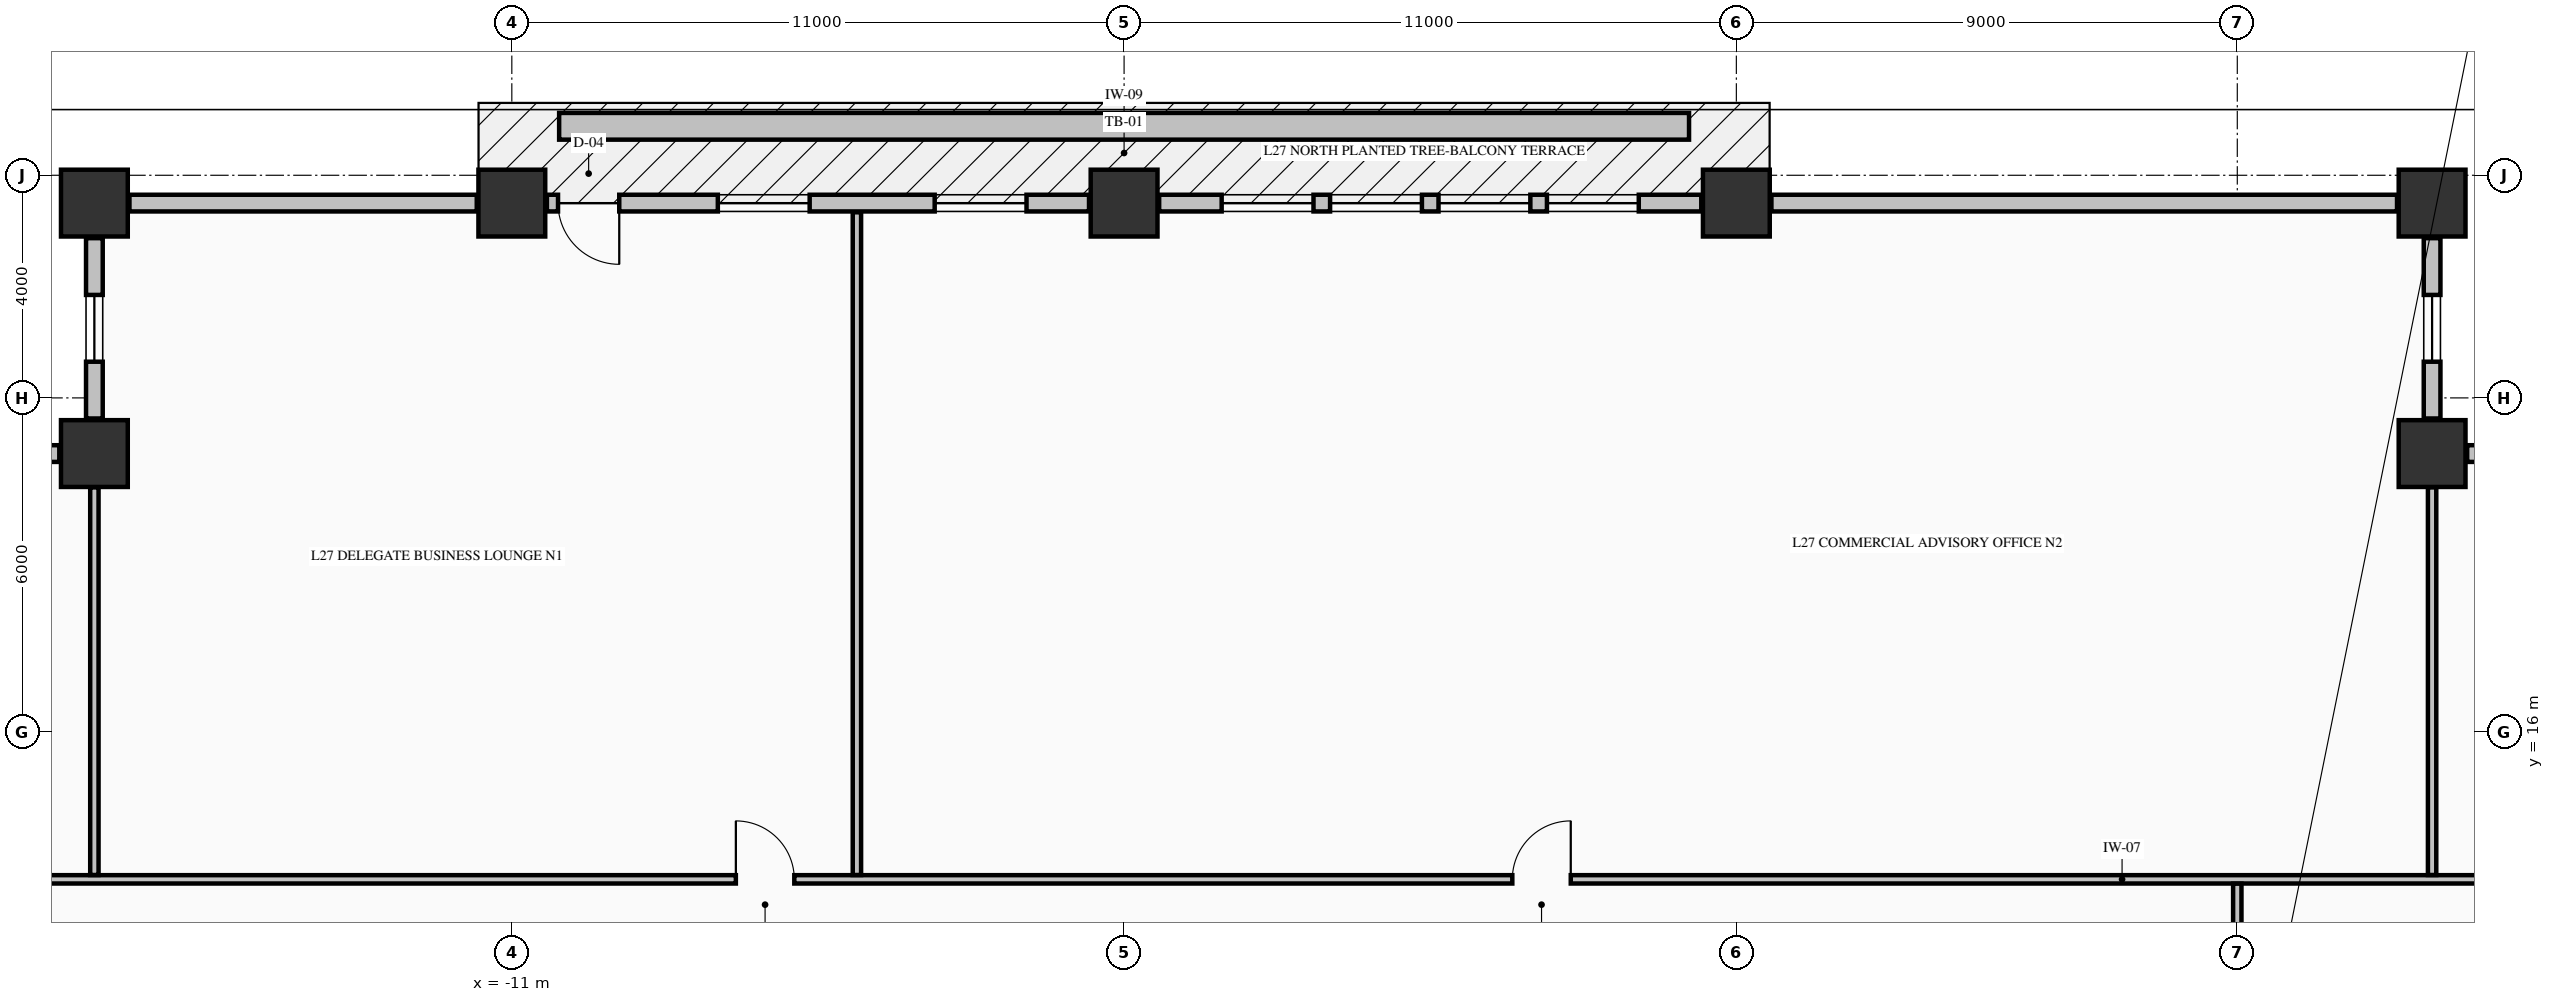
"""IFC4 building model, lengths in metres.
Left out: names, types, materials, properties, quantities, classifications, styles, units other than length and angle.
Written with IfcOpenShell. Run it as: python <this file> out.ifc"""

import sys

from ifc_helpers import new_model, si_unit, direction, frame, frame_2d, origin, origin_2d, place, context, subcontext, project, spatial, rectangle, extrude, element, fill, save


model = new_model("IFC4")
c1 = context("Model", 3, precision=1e-05, world=origin(), true_north=direction((0.0, 1.0)))
c2 = subcontext(c1, "Body", "Model", "MODEL_VIEW")
j1 = project(units=[si_unit("LENGTHUNIT", "METRE"), si_unit("PLANEANGLEUNIT", "RADIAN")], contexts=[c1])
p1 = place(None, origin())
s1 = spatial("IfcSite", under=j1, at=p1, CompositionType="ELEMENT")
p2 = place(p1, origin())
s2 = spatial("IfcBuilding", under=s1, at=p2, CompositionType="ELEMENT")
p3 = place(p2, frame((0.0, 0.0, 109.21)))
s3 = spatial("IfcBuildingStorey", under=s2, at=p3, CompositionType="ELEMENT", Elevation=109.21)
for number, where, z_axis, x_axis in (
    (1, (-18.5, 25.5, -0.25), (0.0, 0.0, 1.0), (1.0, 0.0, 0.0)),
    (2, (-11.0, 25.5, -0.25), (0.0, 0.0, 1.0), (1.0, 0.0, 0.0)),
    (3, (0.0, 25.5, -0.25), (0.0, 0.0, 1.0), (1.0, 0.0, 0.0)),
    (4, (11.0, 25.5, -0.25), (0.0, 0.0, 1.0), (1.0, 0.0, 0.0)),
    (5, (23.5, 25.5, -0.25), (0.0, 0.0, 1.0), (1.0, 0.0, 0.0)),
    (6, (23.5, 21.0, -0.25), (0.0, 0.0, 1.0), (1.0, 0.0, 0.0)),
    (7, (-18.5, 21.0, -0.25), (0.0, 0.0, 1.0), (1.0, 0.0, 0.0)),
):
    element("IfcColumn", number, at=place(p3, frame(where, z_axis=z_axis, x_axis=x_axis)), inside=s3, PredefinedType="COLUMN", context=c2, shape_type="SweptSolid", body=[
        extrude(rectangle(XDim=1.2, YDim=1.2, at=origin_2d()), origin(), (0.0, 0.0, 1.0), 3.57),
    ])
p4 = place(p3, frame((27.37, 21.0, 0.0), z_axis=(0.0, 0.0, 1.0), x_axis=(-1.0, 0.0, 0.0)))
e8 = element("IfcWall", 8, at=p4, inside=s3, PredefinedType="STANDARD", context=c2, shape_type="SweptSolid", body=[
    extrude(rectangle(XDim=3.24, YDim=0.3, at=frame_2d((1.62, 0.0))), origin(), (0.0, 0.0, 1.0), 2.712),
])
p5 = place(p4, frame((1.02, 0.0, 0.82)))
e9 = element("IfcOpeningElement", 9, at=p5, cuts=e8, PredefinedType="OPENING", context=c2, shape_type="SweptSolid", body=[
    extrude(rectangle(XDim=1.2, YDim=1.65, at=frame_2d((0.6, 0.825))), frame((0.0, 0.16, 0.0), z_axis=(0.0, -1.0, 0.0), x_axis=(1.0, 0.0, 0.0)), (0.0, 0.0, 1.0), 0.32),
])
p6 = place(p3, frame((23.5, 21.63, 0.0), z_axis=(0.0, 0.0, 1.0), x_axis=(0.0, 1.0, 0.0)))
e10 = element("IfcWall", 10, at=p6, inside=s3, PredefinedType="STANDARD", context=c2, shape_type="SweptSolid", body=[
    extrude(rectangle(XDim=3.24, YDim=0.3, at=frame_2d((1.62, 0.0))), origin(), (0.0, 0.0, 1.0), 2.712),
])
p7 = place(p6, frame((1.02, 0.0, 0.82)))
e11 = element("IfcOpeningElement", 11, at=p7, cuts=e10, PredefinedType="OPENING", context=c2, shape_type="SweptSolid", body=[
    extrude(rectangle(XDim=1.2, YDim=1.65, at=frame_2d((0.6, 0.825))), frame((0.0, 0.16, 0.0), z_axis=(0.0, -1.0, 0.0), x_axis=(1.0, 0.0, 0.0)), (0.0, 0.0, 1.0), 0.32),
])
p8 = place(p3, frame((-18.5, 24.87, 0.0), z_axis=(0.0, 0.0, 1.0), x_axis=(0.0, -1.0, 0.0)))
e12 = element("IfcWall", 12, at=p8, inside=s3, PredefinedType="STANDARD", context=c2, shape_type="SweptSolid", body=[
    extrude(rectangle(XDim=3.24, YDim=0.3, at=frame_2d((1.62, 0.0))), origin(), (0.0, 0.0, 1.0), 2.712),
])
p9 = place(p8, frame((1.02, 0.0, 0.82)))
e13 = element("IfcOpeningElement", 13, at=p9, cuts=e12, PredefinedType="OPENING", context=c2, shape_type="SweptSolid", body=[
    extrude(rectangle(XDim=1.2, YDim=1.65, at=frame_2d((0.6, 0.825))), frame((0.0, 0.16, 0.0), z_axis=(0.0, -1.0, 0.0), x_axis=(1.0, 0.0, 0.0)), (0.0, 0.0, 1.0), 0.32),
])
p10 = place(p3, frame((-19.13, 21.0, 0.0), z_axis=(0.0, 0.0, 1.0), x_axis=(-1.0, 0.0, 0.0)))
e14 = element("IfcWall", 14, at=p10, inside=s3, PredefinedType="STANDARD", context=c2, shape_type="SweptSolid", body=[
    extrude(rectangle(XDim=3.24, YDim=0.3, at=frame_2d((1.62, 0.0))), origin(), (0.0, 0.0, 1.0), 2.712),
])
p11 = place(p10, frame((1.02, 0.0, 0.82)))
e15 = element("IfcOpeningElement", 15, at=p11, cuts=e14, PredefinedType="OPENING", context=c2, shape_type="SweptSolid", body=[
    extrude(rectangle(XDim=1.2, YDim=1.65, at=frame_2d((0.6, 0.825))), frame((0.0, 0.16, 0.0), z_axis=(0.0, -1.0, 0.0), x_axis=(1.0, 0.0, 0.0)), (0.0, 0.0, 1.0), 0.32),
])
p12 = place(p3, frame((-11.63, 25.5, 0.0), z_axis=(0.0, 0.0, 1.0), x_axis=(-1.0, 0.0, 0.0)))
e16 = element("IfcWall", 16, at=p12, inside=s3, PredefinedType="STANDARD", context=c2, shape_type="SweptSolid", body=[
    extrude(rectangle(XDim=6.24, YDim=0.3, at=frame_2d((3.12, 0.0))), origin(), (0.0, 0.0, 1.0), 2.712),
])
p13 = place(p3, frame((-0.63, 25.5, 0.0), z_axis=(0.0, 0.0, 1.0), x_axis=(-1.0, 0.0, 0.0)))
e17 = element("IfcWall", 17, at=p13, inside=s3, PredefinedType="STANDARD", context=c2, shape_type="SweptSolid", body=[
    extrude(rectangle(XDim=9.74, YDim=0.3, at=frame_2d((4.87, 0.0))), origin(), (0.0, 0.0, 1.0), 2.712),
])
p14 = place(p13, frame((8.44, 0.0, 0.0)))
e18 = element("IfcOpeningElement", 18, at=p14, cuts=e17, PredefinedType="OPENING", context=c2, shape_type="SweptSolid", body=[
    extrude(rectangle(XDim=1.1, YDim=2.15, at=frame_2d((0.55, 1.075))), frame((0.0, 0.16, 0.0), z_axis=(0.0, -1.0, 0.0), x_axis=(1.0, 0.0, 0.0)), (0.0, 0.0, 1.0), 0.32),
])
p15 = place(p13, frame((1.123, 0.0, 0.8)))
e19 = element("IfcOpeningElement", 19, at=p15, cuts=e17, PredefinedType="OPENING", context=c2, shape_type="SweptSolid", body=[
    extrude(rectangle(XDim=1.65, YDim=1.7, at=frame_2d((0.825, 0.85))), frame((0.0, 0.16, 0.0), z_axis=(0.0, -1.0, 0.0), x_axis=(1.0, 0.0, 0.0)), (0.0, 0.0, 1.0), 0.32),
])
p16 = place(p13, frame((5.019, 0.0, 0.8)))
e20 = element("IfcOpeningElement", 20, at=p16, cuts=e17, PredefinedType="OPENING", context=c2, shape_type="SweptSolid", body=[
    extrude(rectangle(XDim=1.65, YDim=1.7, at=frame_2d((0.825, 0.85))), frame((0.0, 0.16, 0.0), z_axis=(0.0, -1.0, 0.0), x_axis=(1.0, 0.0, 0.0)), (0.0, 0.0, 1.0), 0.32),
])
p17 = place(p3, frame((10.37, 25.5, 0.0), z_axis=(0.0, 0.0, 1.0), x_axis=(-1.0, 0.0, 0.0)))
e21 = element("IfcWall", 21, at=p17, inside=s3, PredefinedType="STANDARD", context=c2, shape_type="SweptSolid", body=[
    extrude(rectangle(XDim=9.74, YDim=0.3, at=frame_2d((4.87, 0.0))), origin(), (0.0, 0.0, 1.0), 2.712),
])
p18 = place(p17, frame((1.123, 0.0, 0.8)))
e22 = element("IfcOpeningElement", 22, at=p18, cuts=e21, PredefinedType="OPENING", context=c2, shape_type="SweptSolid", body=[
    extrude(rectangle(XDim=1.65, YDim=1.7, at=frame_2d((0.825, 0.85))), frame((0.0, 0.16, 0.0), z_axis=(0.0, -1.0, 0.0), x_axis=(1.0, 0.0, 0.0)), (0.0, 0.0, 1.0), 0.32),
])
p19 = place(p17, frame((3.071, 0.0, 0.8)))
e23 = element("IfcOpeningElement", 23, at=p19, cuts=e21, PredefinedType="OPENING", context=c2, shape_type="SweptSolid", body=[
    extrude(rectangle(XDim=1.65, YDim=1.7, at=frame_2d((0.825, 0.85))), frame((0.0, 0.16, 0.0), z_axis=(0.0, -1.0, 0.0), x_axis=(1.0, 0.0, 0.0)), (0.0, 0.0, 1.0), 0.32),
])
p20 = place(p17, frame((5.019, 0.0, 0.8)))
e24 = element("IfcOpeningElement", 24, at=p20, cuts=e21, PredefinedType="OPENING", context=c2, shape_type="SweptSolid", body=[
    extrude(rectangle(XDim=1.65, YDim=1.7, at=frame_2d((0.825, 0.85))), frame((0.0, 0.16, 0.0), z_axis=(0.0, -1.0, 0.0), x_axis=(1.0, 0.0, 0.0)), (0.0, 0.0, 1.0), 0.32),
])
p21 = place(p17, frame((6.967, 0.0, 0.8)))
e25 = element("IfcOpeningElement", 25, at=p21, cuts=e21, PredefinedType="OPENING", context=c2, shape_type="SweptSolid", body=[
    extrude(rectangle(XDim=1.65, YDim=1.7, at=frame_2d((0.825, 0.85))), frame((0.0, 0.16, 0.0), z_axis=(0.0, -1.0, 0.0), x_axis=(1.0, 0.0, 0.0)), (0.0, 0.0, 1.0), 0.32),
])
p22 = place(p3, frame((22.87, 25.5, 0.0), z_axis=(0.0, 0.0, 1.0), x_axis=(-1.0, 0.0, 0.0)))
e26 = element("IfcWall", 26, at=p22, inside=s3, PredefinedType="STANDARD", context=c2, shape_type="SweptSolid", body=[
    extrude(rectangle(XDim=11.24, YDim=0.3, at=frame_2d((5.62, 0.0))), origin(), (0.0, 0.0, 1.0), 2.712),
])
p23 = place(p3, frame((-22.835, 13.35, 0.0), z_axis=(0.0, 0.0, 1.0), x_axis=(1.0, 0.0, 0.0)))
e27 = element("IfcWall", 27, at=p23, inside=s3, PredefinedType="PARTITIONING", context=c2, shape_type="SweptSolid", body=[
    extrude(rectangle(XDim=50.67, YDim=0.15, at=frame_2d((25.335, 0.0))), origin(), (0.0, 0.0, 1.0), 3.32),
])
p24 = place(p23, frame((15.86, 0.0, 0.0)))
e28 = element("IfcOpeningElement", 28, at=p24, cuts=e27, PredefinedType="OPENING", context=c2, shape_type="SweptSolid", body=[
    extrude(rectangle(XDim=1.05, YDim=2.15, at=frame_2d((0.525, 1.075))), frame((0.0, 0.085, 0.0), z_axis=(0.0, -1.0, 0.0), x_axis=(1.0, 0.0, 0.0)), (0.0, 0.0, 1.0), 0.17),
])
p25 = place(p23, frame((29.81, 0.0, 0.0)))
e29 = element("IfcOpeningElement", 29, at=p25, cuts=e27, PredefinedType="OPENING", context=c2, shape_type="SweptSolid", body=[
    extrude(rectangle(XDim=1.05, YDim=2.15, at=frame_2d((0.525, 1.075))), frame((0.0, 0.085, 0.0), z_axis=(0.0, -1.0, 0.0), x_axis=(1.0, 0.0, 0.0)), (0.0, 0.0, 1.0), 0.17),
])
p26 = place(p3, frame((-18.5, 13.428, 0.0), z_axis=(0.0, 0.0, 1.0), x_axis=(0.0, 1.0, 0.0)))
e30 = element("IfcWall", 30, at=p26, inside=s3, PredefinedType="PARTITIONING", context=c2, shape_type="SweptSolid", body=[
    extrude(rectangle(XDim=6.966, YDim=0.15, at=frame_2d((3.483, 0.0))), origin(), (0.0, 0.0, 1.0), 3.32),
])
p27 = place(p3, frame((-4.8, 13.428, 0.0), z_axis=(0.0, 0.0, 1.0), x_axis=(0.0, 1.0, 0.0)))
e31 = element("IfcWall", 31, at=p27, inside=s3, PredefinedType="PARTITIONING", context=c2, shape_type="SweptSolid", body=[
    extrude(rectangle(XDim=11.907, YDim=0.15, at=frame_2d((5.954, 0.0))), origin(), (0.0, 0.0, 1.0), 3.32),
])
p28 = place(p3, frame((20.0, 11.006, 0.0), z_axis=(0.0, 0.0, 1.0), x_axis=(0.0, 1.0, 0.0)))
e32 = element("IfcWall", 32, at=p28, inside=s3, PredefinedType="PARTITIONING", context=c2, shape_type="SweptSolid", body=[
    extrude(rectangle(XDim=2.266, YDim=0.15, at=frame_2d((1.133, 0.0))), origin(), (0.0, 0.0, 1.0), 2.81),
])
p29 = place(p28, frame((0.449, 0.0, 0.0)))
e33 = element("IfcOpeningElement", 33, at=p29, cuts=e32, PredefinedType="OPENING", context=c2, shape_type="SweptSolid", body=[
    extrude(rectangle(XDim=0.95, YDim=2.15, at=frame_2d((0.475, 1.075))), frame((0.0, 0.085, 0.0), z_axis=(0.0, -1.0, 0.0), x_axis=(1.0, 0.0, 0.0)), (0.0, 0.0, 1.0), 0.17),
])
p30 = place(p3, frame((23.5, 13.428, 0.0), z_axis=(0.0, 0.0, 1.0), x_axis=(0.0, 1.0, 0.0)))
e34 = element("IfcWall", 34, at=p30, inside=s3, PredefinedType="PARTITIONING", context=c2, shape_type="SweptSolid", body=[
    extrude(rectangle(XDim=6.966, YDim=0.15, at=frame_2d((3.483, 0.0))), origin(), (0.0, 0.0, 1.0), 3.32),
])
p31 = place(p3, frame((-10.15, 26.88, -0.04), z_axis=(0.0, 0.0, 1.0), x_axis=(1.0, 0.0, 0.0)))
e35 = element("IfcWall", 35, at=p31, inside=s3, PredefinedType="PARAPET", context=c2, shape_type="SweptSolid", body=[
    extrude(rectangle(XDim=20.3, YDim=0.48, at=frame_2d((10.15, 0.0))), origin(), (0.0, 0.0, 1.0), 0.52),
])
p32 = place(p7, origin())
e36 = element("IfcWindow", 36, at=p32, inside=s3, PartitioningType="SINGLE_PANEL", PredefinedType="WINDOW", context=c2, shape_type="SweptSolid", body=[
    extrude(rectangle(XDim=1.2, YDim=1.65, at=frame_2d((0.6, 0.825))), frame((0.0, 0.03, 0.0), z_axis=(0.0, -1.0, 0.0), x_axis=(1.0, 0.0, 0.0)), (0.0, 0.0, 1.0), 0.06),
])
fill(e11, e36)
p33 = place(p9, origin())
e37 = element("IfcWindow", 37, at=p33, inside=s3, PartitioningType="SINGLE_PANEL", PredefinedType="WINDOW", context=c2, shape_type="SweptSolid", body=[
    extrude(rectangle(XDim=1.2, YDim=1.65, at=frame_2d((0.6, 0.825))), frame((0.0, 0.03, 0.0), z_axis=(0.0, -1.0, 0.0), x_axis=(1.0, 0.0, 0.0)), (0.0, 0.0, 1.0), 0.06),
])
fill(e13, e37)
p34 = place(p14, origin())
e38 = element("IfcDoor", 38, at=p34, inside=s3, OperationType="SINGLE_SWING_LEFT", PredefinedType="DOOR", context=c2, shape_type="SweptSolid", body=[
    extrude(rectangle(XDim=1.1, YDim=2.15, at=frame_2d((0.55, 1.075))), frame((0.0, 0.025, 0.0), z_axis=(0.0, -1.0, 0.0), x_axis=(1.0, 0.0, 0.0)), (0.0, 0.0, 1.0), 0.05),
])
fill(e18, e38)
p35 = place(p15, origin())
e39 = element("IfcWindow", 39, at=p35, inside=s3, PartitioningType="SINGLE_PANEL", PredefinedType="WINDOW", context=c2, shape_type="SweptSolid", body=[
    extrude(rectangle(XDim=1.65, YDim=1.7, at=frame_2d((0.825, 0.85))), frame((0.0, 0.03, 0.0), z_axis=(0.0, -1.0, 0.0), x_axis=(1.0, 0.0, 0.0)), (0.0, 0.0, 1.0), 0.06),
])
fill(e19, e39)
p36 = place(p16, origin())
e40 = element("IfcWindow", 40, at=p36, inside=s3, PartitioningType="SINGLE_PANEL", PredefinedType="WINDOW", context=c2, shape_type="SweptSolid", body=[
    extrude(rectangle(XDim=1.65, YDim=1.7, at=frame_2d((0.825, 0.85))), frame((0.0, 0.03, 0.0), z_axis=(0.0, -1.0, 0.0), x_axis=(1.0, 0.0, 0.0)), (0.0, 0.0, 1.0), 0.06),
])
fill(e20, e40)
p37 = place(p18, origin())
e41 = element("IfcWindow", 41, at=p37, inside=s3, PartitioningType="SINGLE_PANEL", PredefinedType="WINDOW", context=c2, shape_type="SweptSolid", body=[
    extrude(rectangle(XDim=1.65, YDim=1.7, at=frame_2d((0.825, 0.85))), frame((0.0, 0.03, 0.0), z_axis=(0.0, -1.0, 0.0), x_axis=(1.0, 0.0, 0.0)), (0.0, 0.0, 1.0), 0.06),
])
fill(e22, e41)
p38 = place(p19, origin())
e42 = element("IfcWindow", 42, at=p38, inside=s3, PartitioningType="SINGLE_PANEL", PredefinedType="WINDOW", context=c2, shape_type="SweptSolid", body=[
    extrude(rectangle(XDim=1.65, YDim=1.7, at=frame_2d((0.825, 0.85))), frame((0.0, 0.03, 0.0), z_axis=(0.0, -1.0, 0.0), x_axis=(1.0, 0.0, 0.0)), (0.0, 0.0, 1.0), 0.06),
])
fill(e23, e42)
p39 = place(p20, origin())
e43 = element("IfcWindow", 43, at=p39, inside=s3, PartitioningType="SINGLE_PANEL", PredefinedType="WINDOW", context=c2, shape_type="SweptSolid", body=[
    extrude(rectangle(XDim=1.65, YDim=1.7, at=frame_2d((0.825, 0.85))), frame((0.0, 0.03, 0.0), z_axis=(0.0, -1.0, 0.0), x_axis=(1.0, 0.0, 0.0)), (0.0, 0.0, 1.0), 0.06),
])
fill(e24, e43)
p40 = place(p21, origin())
e44 = element("IfcWindow", 44, at=p40, inside=s3, PartitioningType="SINGLE_PANEL", PredefinedType="WINDOW", context=c2, shape_type="SweptSolid", body=[
    extrude(rectangle(XDim=1.65, YDim=1.7, at=frame_2d((0.825, 0.85))), frame((0.0, 0.03, 0.0), z_axis=(0.0, -1.0, 0.0), x_axis=(1.0, 0.0, 0.0)), (0.0, 0.0, 1.0), 0.06),
])
fill(e25, e44)
p41 = place(p24, origin())
e45 = element("IfcDoor", 45, at=p41, inside=s3, OperationType="SINGLE_SWING_LEFT", PredefinedType="DOOR", context=c2, shape_type="SweptSolid", body=[
    extrude(rectangle(XDim=1.05, YDim=2.15, at=frame_2d((0.525, 1.075))), frame((0.0, 0.025, 0.0), z_axis=(0.0, -1.0, 0.0), x_axis=(1.0, 0.0, 0.0)), (0.0, 0.0, 1.0), 0.05),
])
fill(e28, e45)
p42 = place(p25, origin())
e46 = element("IfcDoor", 46, at=p42, inside=s3, OperationType="SINGLE_SWING_RIGHT", PredefinedType="DOOR", context=c2, shape_type="SweptSolid", body=[
    extrude(rectangle(XDim=1.05, YDim=2.15, at=frame_2d((0.525, 1.075))), frame((0.0, 0.025, 0.0), z_axis=(0.0, -1.0, 0.0), x_axis=(1.0, 0.0, 0.0)), (0.0, 0.0, 1.0), 0.05),
])
fill(e29, e46)
save(model, sys.argv[1])
